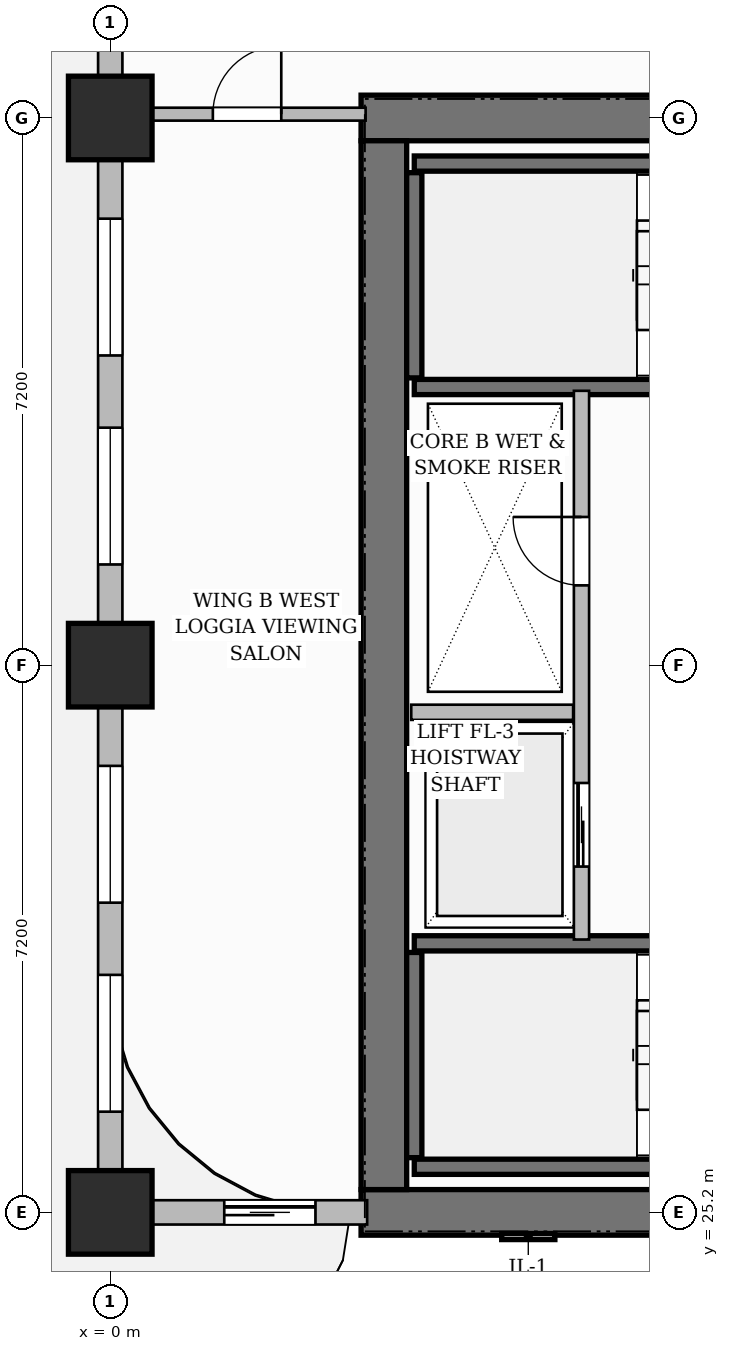
"""IFC4 building model, lengths in metres.
Left out: names, types, materials, properties, quantities, classifications, styles, units other than length and angle.
Written with IfcOpenShell. Run it as: python <this file> out.ifc"""

import sys

from ifc_helpers import new_model, si_unit, direction, frame, frame_2d, origin, origin_2d, place, context, subcontext, project, spatial, rectangle, extrude, source, transform, mapped, element, fill, save


model = new_model("IFC4")
c1 = context("Model", 3, precision=1e-05, world=origin(), true_north=direction((0.0, 1.0)))
c2 = subcontext(c1, "Body", "Model", "MODEL_VIEW")
j1 = project(units=[si_unit("LENGTHUNIT", "METRE"), si_unit("PLANEANGLEUNIT", "RADIAN")], contexts=[c1])
p1 = place(None, origin())
s1 = spatial("IfcSite", under=j1, at=p1, CompositionType="ELEMENT")
p2 = place(p1, origin())
s2 = spatial("IfcBuilding", under=s1, at=p2, CompositionType="ELEMENT")
p3 = place(p2, frame((0.0, 0.0, 39.8)))
s3 = spatial("IfcBuildingStorey", under=s2, at=p3, CompositionType="ELEMENT", Elevation=39.8)
for number, where, z_axis, x_axis in (
    (1, (3.3, 25.2, 0.0), (0.0, 0.0, 1.0), (1.0, 0.0, 0.0)),
    (2, (3.3, 39.6, 0.0), (0.0, 0.0, 1.0), (1.0, 0.0, 0.0)),
):
    element("IfcWall", number, at=place(p3, frame(where, z_axis=z_axis, x_axis=x_axis)), inside=s3, PredefinedType="SHEAR", context=c2, shape_type="SweptSolid", body=[
        extrude(rectangle(XDim=8.4, YDim=0.6, at=frame_2d((4.2, 0.0))), origin(), (0.0, 0.0, 1.0), 3.7),
    ])
p4 = place(p3, frame((3.6, 25.5, 0.0), z_axis=(0.0, 0.0, 1.0), x_axis=(0.0, 1.0, 0.0)))
e3 = element("IfcWall", 3, at=p4, inside=s3, PredefinedType="SHEAR", context=c2, shape_type="SweptSolid", body=[
    extrude(rectangle(XDim=13.8, YDim=0.6, at=frame_2d((6.9, 0.0))), origin(), (0.0, 0.0, 1.0), 3.7),
])
m1 = source(origin(), c2, "Body", "SweptSolid", [
    extrude(rectangle(XDim=1.1, YDim=1.1, at=origin_2d()), origin(), (0.0, 0.0, 1.0), 3.7),
])
for number, where, z_axis, x_axis in (
    (4, (0.0, 25.2, 0.0), (0.0, 0.0, 1.0), (1.0, 0.0, 0.0)),
    (5, (0.0, 32.4, 0.0), (0.0, 0.0, 1.0), (1.0, 0.0, 0.0)),
    (6, (0.0, 39.6, 0.0), (0.0, 0.0, 1.0), (1.0, 0.0, 0.0)),
):
    element("IfcColumn", number, at=place(p3, frame(where, z_axis=z_axis, x_axis=x_axis)), inside=s3, PredefinedType="COLUMN", context=c2, shape_type="MappedRepresentation", body=[
        mapped(m1, transform((0.0, 0.0, 0.0), scale=1.0)),
    ])
p5 = place(p3, frame((4.0, 25.8, 0.0), z_axis=(0.0, 0.0, 1.0), x_axis=(1.0, 0.0, 0.0)))
e7 = element("IfcWall", 7, at=p5, inside=s3, PredefinedType="SHEAR", context=c2, shape_type="SweptSolid", body=[
    extrude(rectangle(XDim=7.1, YDim=0.2, at=frame_2d((3.55, 0.0))), origin(), (0.0, 0.0, 1.0), 3.7),
])
p6 = place(p3, frame((4.0, 25.92, 0.0), z_axis=(0.0, 0.0, 1.0), x_axis=(0.0, 1.0, 0.0)))
e8 = element("IfcWall", 8, at=p6, inside=s3, PredefinedType="SHEAR", context=c2, shape_type="SweptSolid", body=[
    extrude(rectangle(XDim=2.7, YDim=0.2, at=frame_2d((1.35, 0.0))), origin(), (0.0, 0.0, 1.0), 3.7),
])
p7 = place(p3, frame((4.0, 28.74, 0.0), z_axis=(0.0, 0.0, 1.0), x_axis=(1.0, 0.0, 0.0)))
e9 = element("IfcWall", 9, at=p7, inside=s3, PredefinedType="SHEAR", context=c2, shape_type="SweptSolid", body=[
    extrude(rectangle(XDim=7.1, YDim=0.2, at=frame_2d((3.55, 0.0))), origin(), (0.0, 0.0, 1.0), 3.7),
])
p8 = place(p7, frame((5.815, 0.0, 0.0)))
e10 = element("IfcOpeningElement", 10, at=p8, cuts=e9, PredefinedType="OPENING", context=c2, shape_type="SweptSolid", body=[
    extrude(rectangle(XDim=1.05, YDim=2.2, at=frame_2d((0.525, 1.1))), frame((0.0, 0.11, 0.0), z_axis=(0.0, -1.0, 0.0), x_axis=(1.0, 0.0, 0.0)), (0.0, 0.0, 1.0), 0.22),
])
p9 = place(p3, frame((4.0, 39.0, 0.0), z_axis=(0.0, 0.0, 1.0), x_axis=(1.0, 0.0, 0.0)))
e11 = element("IfcWall", 11, at=p9, inside=s3, PredefinedType="SHEAR", context=c2, shape_type="SweptSolid", body=[
    extrude(rectangle(XDim=7.1, YDim=0.2, at=frame_2d((3.55, 0.0))), origin(), (0.0, 0.0, 1.0), 3.7),
])
p10 = place(p3, frame((4.0, 36.18, 0.0), z_axis=(0.0, 0.0, 1.0), x_axis=(0.0, 1.0, 0.0)))
e12 = element("IfcWall", 12, at=p10, inside=s3, PredefinedType="SHEAR", context=c2, shape_type="SweptSolid", body=[
    extrude(rectangle(XDim=2.7, YDim=0.2, at=frame_2d((1.35, 0.0))), origin(), (0.0, 0.0, 1.0), 3.7),
])
p11 = place(p3, frame((4.0, 36.06, 0.0), z_axis=(0.0, 0.0, 1.0), x_axis=(1.0, 0.0, 0.0)))
e13 = element("IfcWall", 13, at=p11, inside=s3, PredefinedType="SHEAR", context=c2, shape_type="SweptSolid", body=[
    extrude(rectangle(XDim=7.1, YDim=0.2, at=frame_2d((3.55, 0.0))), origin(), (0.0, 0.0, 1.0), 3.7),
])
p12 = place(p11, frame((5.815, 0.0, 0.0)))
e14 = element("IfcOpeningElement", 14, at=p12, cuts=e13, PredefinedType="OPENING", context=c2, shape_type="SweptSolid", body=[
    extrude(rectangle(XDim=1.05, YDim=2.2, at=frame_2d((0.525, 1.1))), frame((0.0, 0.11, 0.0), z_axis=(0.0, -1.0, 0.0), x_axis=(1.0, 0.0, 0.0)), (0.0, 0.0, 1.0), 0.22),
])
p13 = place(p3, frame((6.2, 28.79, 0.0), z_axis=(0.0, 0.0, 1.0), x_axis=(0.0, 1.0, 0.0)))
e15 = element("IfcWall", 15, at=p13, inside=s3, PredefinedType="PARTITIONING", context=c2, shape_type="SweptSolid", body=[
    extrude(rectangle(XDim=7.22, YDim=0.2, at=frame_2d((3.61, 0.0))), origin(), (0.0, 0.0, 1.0), 3.45),
])
p14 = place(p13, frame((4.66, 0.0, 0.0)))
e16 = element("IfcOpeningElement", 16, at=p14, cuts=e15, PredefinedType="OPENING", context=c2, shape_type="SweptSolid", body=[
    extrude(rectangle(XDim=0.9, YDim=2.1, at=frame_2d((0.45, 1.05))), frame((0.0, 0.11, 0.0), z_axis=(0.0, -1.0, 0.0), x_axis=(1.0, 0.0, 0.0)), (0.0, 0.0, 1.0), 0.22),
])
p15 = place(p13, frame((0.96, 0.0, 0.0)))
e17 = element("IfcOpeningElement", 17, at=p15, cuts=e15, PredefinedType="OPENING", context=c2, shape_type="SweptSolid", body=[
    extrude(rectangle(XDim=1.1, YDim=2.2, at=frame_2d((0.55, 1.1))), frame((0.0, 0.11, 0.0), z_axis=(0.0, -1.0, 0.0), x_axis=(1.0, 0.0, 0.0)), (0.0, 0.0, 1.0), 0.22),
])
p16 = place(p3, frame((3.96, 31.78, 0.0), z_axis=(0.0, 0.0, 1.0), x_axis=(1.0, 0.0, 0.0)))
e18 = element("IfcWall", 18, at=p16, inside=s3, PredefinedType="PARTITIONING", context=c2, shape_type="SweptSolid", body=[
    extrude(rectangle(XDim=2.13, YDim=0.2, at=frame_2d((1.065, 0.0))), origin(), (0.0, 0.0, 1.0), 3.45),
])
p17 = place(p3, frame((0.24, 39.65, 0.0), z_axis=(0.0, 0.0, 1.0), x_axis=(1.0, 0.0, 0.0)))
e19 = element("IfcWall", 19, at=p17, inside=s3, PredefinedType="PARTITIONING", context=c2, shape_type="SweptSolid", body=[
    extrude(rectangle(XDim=3.12, YDim=0.17, at=frame_2d((1.56, 0.0))), origin(), (0.0, 0.0, 1.0), 3.45),
])
p18 = place(p17, frame((1.11, 0.0, 0.0)))
e20 = element("IfcOpeningElement", 20, at=p18, cuts=e19, PredefinedType="OPENING", context=c2, shape_type="SweptSolid", body=[
    extrude(rectangle(XDim=0.9, YDim=2.15, at=frame_2d((0.45, 1.075))), frame((0.0, 0.095, 0.0), z_axis=(0.0, -1.0, 0.0), x_axis=(1.0, 0.0, 0.0)), (0.0, 0.0, 1.0), 0.19),
])
p19 = place(p3, frame((0.0, 25.2, 0.0), z_axis=(0.0, 0.0, 1.0), x_axis=(1.0, 0.0, 0.0)))
e21 = element("IfcWall", 21, at=p19, inside=s3, PredefinedType="SOLIDWALL", context=c2, shape_type="SweptSolid", body=[
    extrude(rectangle(XDim=3.38, YDim=0.32, at=frame_2d((1.69, 0.0))), origin(), (0.0, 0.0, 1.0), 3.45),
])
p20 = place(p19, frame((1.5, 0.0, 0.0)))
e22 = element("IfcOpeningElement", 22, at=p20, cuts=e21, PredefinedType="OPENING", context=c2, shape_type="SweptSolid", body=[
    extrude(rectangle(XDim=1.2, YDim=2.2, at=frame_2d((0.6, 1.1))), frame((0.0, 0.17, 0.0), z_axis=(0.0, -1.0, 0.0), x_axis=(1.0, 0.0, 0.0)), (0.0, 0.0, 1.0), 0.34),
])
p21 = place(p3, frame((0.0, 25.25, 0.0), z_axis=(0.0, 0.0, 1.0), x_axis=(0.0, 1.0, 0.0)))
e23 = element("IfcWall", 23, at=p21, inside=s3, PredefinedType="SOLIDWALL", context=c2, shape_type="SweptSolid", body=[
    extrude(rectangle(XDim=21.5, YDim=0.32, at=frame_2d((10.75, 0.0))), origin(), (0.0, 0.0, 1.0), 2.885),
])
p22 = place(p21, frame((1.275, 0.0, 0.8)))
e24 = element("IfcOpeningElement", 24, at=p22, cuts=e23, PredefinedType="OPENING", context=c2, shape_type="SweptSolid", body=[
    extrude(rectangle(XDim=1.8, YDim=1.85, at=frame_2d((0.9, 0.925))), frame((0.0, 0.17, 0.0), z_axis=(0.0, -1.0, 0.0), x_axis=(1.0, 0.0, 0.0)), (0.0, 0.0, 1.0), 0.34),
])
p23 = place(p21, frame((4.025, 0.0, 0.8)))
e25 = element("IfcOpeningElement", 25, at=p23, cuts=e23, PredefinedType="OPENING", context=c2, shape_type="SweptSolid", body=[
    extrude(rectangle(XDim=1.8, YDim=1.85, at=frame_2d((0.9, 0.925))), frame((0.0, 0.17, 0.0), z_axis=(0.0, -1.0, 0.0), x_axis=(1.0, 0.0, 0.0)), (0.0, 0.0, 1.0), 0.34),
])
p24 = place(p21, frame((8.475, 0.0, 0.8)))
e26 = element("IfcOpeningElement", 26, at=p24, cuts=e23, PredefinedType="OPENING", context=c2, shape_type="SweptSolid", body=[
    extrude(rectangle(XDim=1.8, YDim=1.85, at=frame_2d((0.9, 0.925))), frame((0.0, 0.17, 0.0), z_axis=(0.0, -1.0, 0.0), x_axis=(1.0, 0.0, 0.0)), (0.0, 0.0, 1.0), 0.34),
])
p25 = place(p21, frame((11.225, 0.0, 0.8)))
e27 = element("IfcOpeningElement", 27, at=p25, cuts=e23, PredefinedType="OPENING", context=c2, shape_type="SweptSolid", body=[
    extrude(rectangle(XDim=1.8, YDim=1.85, at=frame_2d((0.9, 0.925))), frame((0.0, 0.17, 0.0), z_axis=(0.0, -1.0, 0.0), x_axis=(1.0, 0.0, 0.0)), (0.0, 0.0, 1.0), 0.34),
])
p26 = place(p21, frame((15.447, 0.0, 0.8)))
e28 = element("IfcOpeningElement", 28, at=p26, cuts=e23, PredefinedType="OPENING", context=c2, shape_type="SweptSolid", body=[
    extrude(rectangle(XDim=1.4, YDim=1.85, at=frame_2d((0.7, 0.925))), frame((0.0, 0.17, 0.0), z_axis=(0.0, -1.0, 0.0), x_axis=(1.0, 0.0, 0.0)), (0.0, 0.0, 1.0), 0.34),
])
p27 = place(p21, frame((18.053, 0.0, 0.8)))
e29 = element("IfcOpeningElement", 29, at=p27, cuts=e23, PredefinedType="OPENING", context=c2, shape_type="SweptSolid", body=[
    extrude(rectangle(XDim=1.8, YDim=1.85, at=frame_2d((0.9, 0.925))), frame((0.0, 0.17, 0.0), z_axis=(0.0, -1.0, 0.0), x_axis=(1.0, 0.0, 0.0)), (0.0, 0.0, 1.0), 0.34),
])
m2 = source(origin(), c2, "Body", "SweptSolid", [
    extrude(rectangle(XDim=0.9, YDim=2.1, at=frame_2d((0.45, 1.05))), frame((0.0, 0.025, 0.0), z_axis=(0.0, -1.0, 0.0), x_axis=(1.0, 0.0, 0.0)), (0.0, 0.0, 1.0), 0.05),
])
p28 = place(p14, origin())
e30 = element("IfcDoor", 30, at=p28, inside=s3, OperationType="SINGLE_SWING_RIGHT", PredefinedType="DOOR", context=c2, shape_type="MappedRepresentation", body=[
    mapped(m2, transform((0.0, 0.0, 0.0), scale=1.0)),
])
fill(e16, e30)
m3 = source(origin(), c2, "Body", "SweptSolid", [
    extrude(rectangle(XDim=0.9, YDim=2.15, at=frame_2d((0.45, 1.075))), frame((0.0, 0.025, 0.0), z_axis=(0.0, -1.0, 0.0), x_axis=(1.0, 0.0, 0.0)), (0.0, 0.0, 1.0), 0.05),
])
p29 = place(p18, origin())
e31 = element("IfcDoor", 31, at=p29, inside=s3, OperationType="SINGLE_SWING_RIGHT", PredefinedType="DOOR", context=c2, shape_type="MappedRepresentation", body=[
    mapped(m3, transform((0.0, 0.0, 0.0), scale=1.0)),
])
fill(e20, e31)
m4 = source(origin(), c2, "Body", "SweptSolid", [
    extrude(rectangle(XDim=1.1, YDim=2.2, at=frame_2d((0.55, 1.1))), frame((0.0, 0.025, 0.0), z_axis=(0.0, -1.0, 0.0), x_axis=(1.0, 0.0, 0.0)), (0.0, 0.0, 1.0), 0.05),
])
p30 = place(p15, origin())
e32 = element("IfcDoor", 32, at=p30, inside=s3, OperationType="SLIDING_TO_LEFT", PredefinedType="DOOR", context=c2, shape_type="MappedRepresentation", body=[
    mapped(m4, transform((0.0, 0.0, 0.0), scale=1.0)),
])
fill(e17, e32)
m5 = source(origin(), c2, "Body", "SweptSolid", [
    extrude(rectangle(XDim=1.2, YDim=2.2, at=frame_2d((0.6, 1.1))), frame((0.0, 0.025, 0.0), z_axis=(0.0, -1.0, 0.0), x_axis=(1.0, 0.0, 0.0)), (0.0, 0.0, 1.0), 0.05),
])
p31 = place(p20, origin())
e33 = element("IfcDoor", 33, at=p31, inside=s3, OperationType="SLIDING_TO_LEFT", PredefinedType="DOOR", context=c2, shape_type="MappedRepresentation", body=[
    mapped(m5, transform((0.0, 0.0, 0.0), scale=1.0)),
])
fill(e22, e33)
m6 = source(origin(), c2, "Body", "SweptSolid", [
    extrude(rectangle(XDim=1.8, YDim=1.85, at=frame_2d((0.9, 0.925))), frame((0.0, 0.03, 0.0), z_axis=(0.0, -1.0, 0.0), x_axis=(1.0, 0.0, 0.0)), (0.0, 0.0, 1.0), 0.06),
])
p32 = place(p22, origin())
e34 = element("IfcWindow", 34, at=p32, inside=s3, PartitioningType="DOUBLE_PANEL_VERTICAL", PredefinedType="WINDOW", context=c2, shape_type="MappedRepresentation", body=[
    mapped(m6, transform((0.0, 0.0, 0.0), scale=1.0)),
])
fill(e24, e34)
p33 = place(p23, origin())
e35 = element("IfcWindow", 35, at=p33, inside=s3, PartitioningType="DOUBLE_PANEL_VERTICAL", PredefinedType="WINDOW", context=c2, shape_type="MappedRepresentation", body=[
    mapped(m6, transform((0.0, 0.0, 0.0), scale=1.0)),
])
fill(e25, e35)
p34 = place(p24, origin())
e36 = element("IfcWindow", 36, at=p34, inside=s3, PartitioningType="DOUBLE_PANEL_VERTICAL", PredefinedType="WINDOW", context=c2, shape_type="MappedRepresentation", body=[
    mapped(m6, transform((0.0, 0.0, 0.0), scale=1.0)),
])
fill(e26, e36)
p35 = place(p25, origin())
e37 = element("IfcWindow", 37, at=p35, inside=s3, PartitioningType="DOUBLE_PANEL_VERTICAL", PredefinedType="WINDOW", context=c2, shape_type="MappedRepresentation", body=[
    mapped(m6, transform((0.0, 0.0, 0.0), scale=1.0)),
])
fill(e27, e37)
save(model, sys.argv[1])
